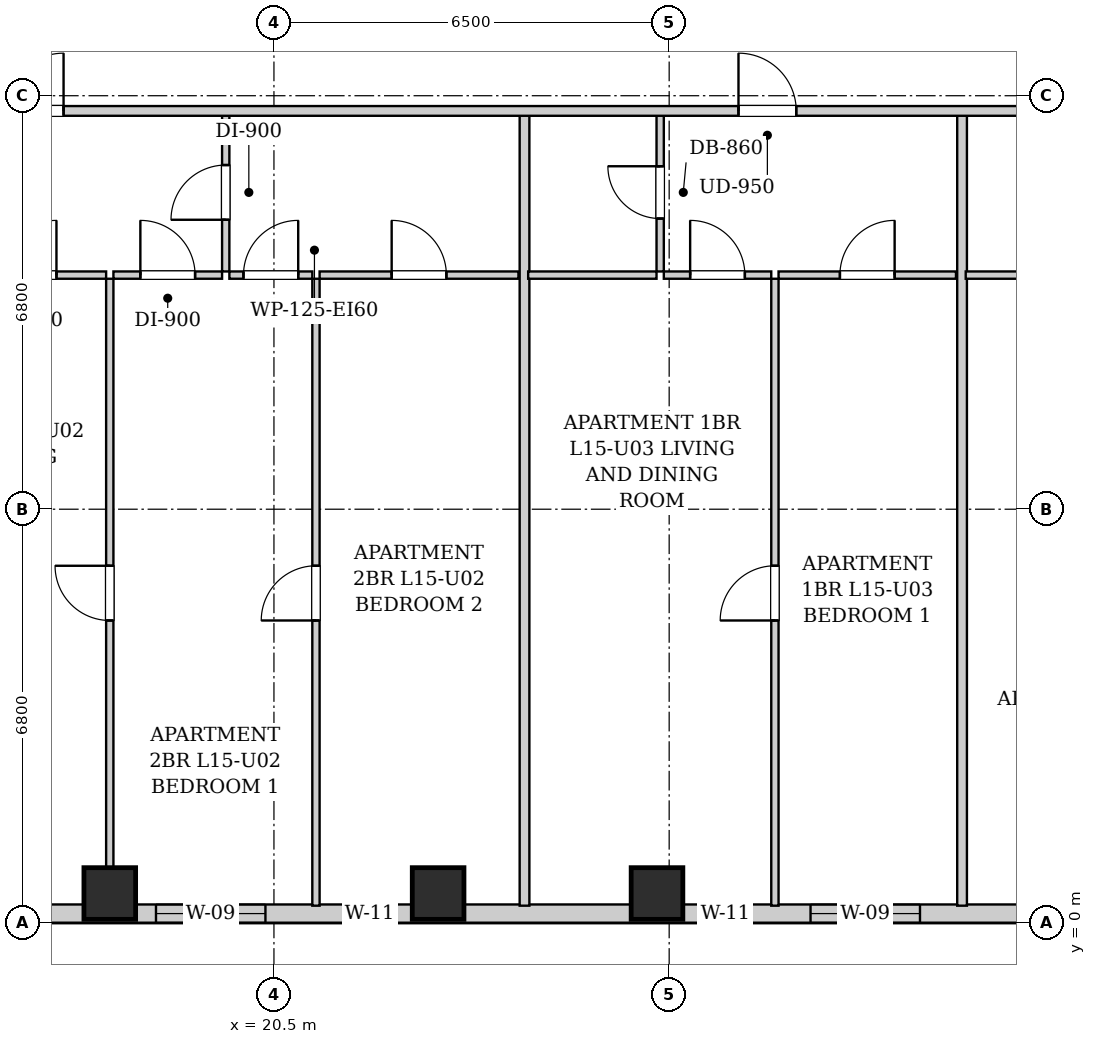
"""IFC4 building model, lengths in metres.
Left out: names, types, materials, properties, quantities, classifications, styles, units other than length and angle.
Written with IfcOpenShell. Run it as: python <this file> out.ifc"""

import sys

from ifc_helpers import new_model, si_unit, direction, frame, frame_2d, origin, origin_2d, place, context, subcontext, project, spatial, rectangle, extrude, element, fill, save


model = new_model("IFC4")
c1 = context("Model", 3, precision=1e-05, world=origin(), true_north=direction((0.0, 1.0)))
c2 = subcontext(c1, "Body", "Model", "MODEL_VIEW")
j1 = project(units=[si_unit("LENGTHUNIT", "METRE"), si_unit("PLANEANGLEUNIT", "RADIAN")], contexts=[c1])
p1 = place(None, origin())
s1 = spatial("IfcSite", under=j1, at=p1, CompositionType="ELEMENT")
p2 = place(p1, origin())
s2 = spatial("IfcBuilding", under=s1, at=p2, CompositionType="ELEMENT")
p3 = place(p2, frame((0.0, 0.0, 57.8)))
s3 = spatial("IfcBuildingStorey", under=s2, at=p3, CompositionType="ELEMENT", Elevation=57.8)
for number, where, z_axis, x_axis in (
    (1, (17.8, 0.48, 0.0), (0.0, 0.0, 1.0), (1.0, 0.0, 0.0)),
    (2, (23.2, 0.48, 0.0), (0.0, 0.0, 1.0), (1.0, 0.0, 0.0)),
    (3, (26.8, 0.48, 0.0), (0.0, 0.0, 1.0), (1.0, 0.0, 0.0)),
):
    element("IfcColumn", number, at=place(p3, frame(where, z_axis=z_axis, x_axis=x_axis)), inside=s3, PredefinedType="COLUMN", context=c2, shape_type="SweptSolid", body=[
        extrude(rectangle(XDim=0.85, YDim=0.85, at=origin_2d()), origin(), (0.0, 0.0, 1.0), 3.2),
    ])
p4 = place(p3, frame((44.0, 0.15, 0.0), z_axis=(0.0, 0.0, 1.0), x_axis=(-1.0, 0.0, 0.0)))
e4 = element("IfcWall", 4, at=p4, inside=s3, PredefinedType="SOLIDWALL", context=c2, shape_type="SweptSolid", body=[
    extrude(rectangle(XDim=27.55, YDim=0.3, at=frame_2d((13.775, 0.0))), origin(), (0.0, 0.0, 1.0), 1.975),
])
p5 = place(p4, frame((23.64, 0.0, 0.55)))
e5 = element("IfcOpeningElement", 5, at=p5, cuts=e4, PredefinedType="OPENING", context=c2, shape_type="SweptSolid", body=[
    extrude(rectangle(XDim=1.8, YDim=1.2, at=frame_2d((0.9, 0.6))), frame((0.0, 0.16, 0.0), z_axis=(0.0, -1.0, 0.0), x_axis=(1.0, 0.0, 0.0)), (0.0, 0.0, 1.0), 0.32),
])
p6 = place(p4, frame((21.5, 0.0, 0.55)))
e6 = element("IfcOpeningElement", 6, at=p6, cuts=e4, PredefinedType="OPENING", context=c2, shape_type="SweptSolid", body=[
    extrude(rectangle(XDim=0.85, YDim=1.2, at=frame_2d((0.425, 0.6))), frame((0.0, 0.16, 0.0), z_axis=(0.0, -1.0, 0.0), x_axis=(1.0, 0.0, 0.0)), (0.0, 0.0, 1.0), 0.32),
])
p7 = place(p4, frame((15.65, 0.0, 0.55)))
e7 = element("IfcOpeningElement", 7, at=p7, cuts=e4, PredefinedType="OPENING", context=c2, shape_type="SweptSolid", body=[
    extrude(rectangle(XDim=0.85, YDim=1.2, at=frame_2d((0.425, 0.6))), frame((0.0, 0.16, 0.0), z_axis=(0.0, -1.0, 0.0), x_axis=(1.0, 0.0, 0.0)), (0.0, 0.0, 1.0), 0.32),
])
p8 = place(p4, frame((12.875, 0.0, 0.55)))
e8 = element("IfcOpeningElement", 8, at=p8, cuts=e4, PredefinedType="OPENING", context=c2, shape_type="SweptSolid", body=[
    extrude(rectangle(XDim=1.8, YDim=1.2, at=frame_2d((0.9, 0.6))), frame((0.0, 0.16, 0.0), z_axis=(0.0, -1.0, 0.0), x_axis=(1.0, 0.0, 0.0)), (0.0, 0.0, 1.0), 0.32),
])
p9 = place(p4, frame((9.365, 0.0, 0.55)))
e9 = element("IfcOpeningElement", 9, at=p9, cuts=e4, PredefinedType="OPENING", context=c2, shape_type="SweptSolid", body=[
    extrude(rectangle(XDim=0.85, YDim=1.2, at=frame_2d((0.425, 0.6))), frame((0.0, 0.16, 0.0), z_axis=(0.0, -1.0, 0.0), x_axis=(1.0, 0.0, 0.0)), (0.0, 0.0, 1.0), 0.32),
])
p10 = place(p4, frame((6.477, 0.0, 0.55)))
e10 = element("IfcOpeningElement", 10, at=p10, cuts=e4, PredefinedType="OPENING", context=c2, shape_type="SweptSolid", body=[
    extrude(rectangle(XDim=1.8, YDim=1.2, at=frame_2d((0.9, 0.6))), frame((0.0, 0.16, 0.0), z_axis=(0.0, -1.0, 0.0), x_axis=(1.0, 0.0, 0.0)), (0.0, 0.0, 1.0), 0.32),
])
p11 = place(p4, frame((2.186, 0.0, 0.55)))
e11 = element("IfcOpeningElement", 11, at=p11, cuts=e4, PredefinedType="OPENING", context=c2, shape_type="SweptSolid", body=[
    extrude(rectangle(XDim=1.8, YDim=1.2, at=frame_2d((0.9, 0.6))), frame((0.0, 0.16, 0.0), z_axis=(0.0, -1.0, 0.0), x_axis=(1.0, 0.0, 0.0)), (0.0, 0.0, 1.0), 0.32),
])
p12 = place(p3, frame((19.707, 10.71, 0.0), z_axis=(0.0, 0.0, 1.0), x_axis=(0.0, 1.0, 0.0)))
e12 = element("IfcWall", 12, at=p12, inside=s3, PredefinedType="PARTITIONING", context=c2, shape_type="SweptSolid", body=[
    extrude(rectangle(XDim=2.6, YDim=0.12, at=frame_2d((1.3, 0.0))), origin(), (0.0, 0.0, 1.0), 2.94),
])
p13 = place(p12, frame((0.85, 0.0, 0.0)))
e13 = element("IfcOpeningElement", 13, at=p13, cuts=e12, PredefinedType="OPENING", context=c2, shape_type="SweptSolid", body=[
    extrude(rectangle(XDim=0.9, YDim=2.05, at=frame_2d((0.45, 1.025))), frame((0.0, 0.07, 0.0), z_axis=(0.0, -1.0, 0.0), x_axis=(1.0, 0.0, 0.0)), (0.0, 0.0, 1.0), 0.14),
])
p14 = place(p3, frame((15.207, 10.65, 0.0), z_axis=(0.0, 0.0, 1.0), x_axis=(1.0, 0.0, 0.0)))
e14 = element("IfcWall", 14, at=p14, inside=s3, PredefinedType="PARTITIONING", context=c2, shape_type="SweptSolid", body=[
    extrude(rectangle(XDim=2.533, YDim=0.12, at=frame_2d((1.267, 0.0))), origin(), (0.0, 0.0, 1.0), 2.94),
])
p15 = place(p14, frame((0.816, 0.0, 0.0)))
e15 = element("IfcOpeningElement", 15, at=p15, cuts=e14, PredefinedType="OPENING", context=c2, shape_type="SweptSolid", body=[
    extrude(rectangle(XDim=0.9, YDim=2.05, at=frame_2d((0.45, 1.025))), frame((0.0, 0.07, 0.0), z_axis=(0.0, -1.0, 0.0), x_axis=(1.0, 0.0, 0.0)), (0.0, 0.0, 1.0), 0.14),
])
p16 = place(p3, frame((17.86, 10.65, 0.0), z_axis=(0.0, 0.0, 1.0), x_axis=(1.0, 0.0, 0.0)))
e16 = element("IfcWall", 16, at=p16, inside=s3, PredefinedType="PARTITIONING", context=c2, shape_type="SweptSolid", body=[
    extrude(rectangle(XDim=1.787, YDim=0.12, at=frame_2d((0.894, 0.0))), origin(), (0.0, 0.0, 1.0), 2.94),
])
p17 = place(p16, frame((0.443, 0.0, 0.0)))
e17 = element("IfcOpeningElement", 17, at=p17, cuts=e16, PredefinedType="OPENING", context=c2, shape_type="SweptSolid", body=[
    extrude(rectangle(XDim=0.9, YDim=2.05, at=frame_2d((0.45, 1.025))), frame((0.0, 0.07, 0.0), z_axis=(0.0, -1.0, 0.0), x_axis=(1.0, 0.0, 0.0)), (0.0, 0.0, 1.0), 0.14),
])
p18 = place(p3, frame((19.767, 10.65, 0.0), z_axis=(0.0, 0.0, 1.0), x_axis=(1.0, 0.0, 0.0)))
e18 = element("IfcWall", 18, at=p18, inside=s3, PredefinedType="PARTITIONING", context=c2, shape_type="SweptSolid", body=[
    extrude(rectangle(XDim=1.364, YDim=0.12, at=frame_2d((0.682, 0.0))), origin(), (0.0, 0.0, 1.0), 2.94),
])
p19 = place(p18, frame((0.232, 0.0, 0.0)))
e19 = element("IfcOpeningElement", 19, at=p19, cuts=e18, PredefinedType="OPENING", context=c2, shape_type="SweptSolid", body=[
    extrude(rectangle(XDim=0.9, YDim=2.05, at=frame_2d((0.45, 1.025))), frame((0.0, 0.07, 0.0), z_axis=(0.0, -1.0, 0.0), x_axis=(1.0, 0.0, 0.0)), (0.0, 0.0, 1.0), 0.14),
])
p20 = place(p3, frame((21.251, 10.65, 0.0), z_axis=(0.0, 0.0, 1.0), x_axis=(1.0, 0.0, 0.0)))
e20 = element("IfcWall", 20, at=p20, inside=s3, PredefinedType="PARTITIONING", context=c2, shape_type="SweptSolid", body=[
    extrude(rectangle(XDim=3.27, YDim=0.12, at=frame_2d((1.635, 0.0))), origin(), (0.0, 0.0, 1.0), 2.94),
])
p21 = place(p20, frame((1.185, 0.0, 0.0)))
e21 = element("IfcOpeningElement", 21, at=p21, cuts=e20, PredefinedType="OPENING", context=c2, shape_type="SweptSolid", body=[
    extrude(rectangle(XDim=0.9, YDim=2.05, at=frame_2d((0.45, 1.025))), frame((0.0, 0.07, 0.0), z_axis=(0.0, -1.0, 0.0), x_axis=(1.0, 0.0, 0.0)), (0.0, 0.0, 1.0), 0.14),
])
p22 = place(p3, frame((17.8, 0.28, 0.0), z_axis=(0.0, 0.0, 1.0), x_axis=(0.0, 1.0, 0.0)))
e22 = element("IfcWall", 22, at=p22, inside=s3, PredefinedType="PARTITIONING", context=c2, shape_type="SweptSolid", body=[
    extrude(rectangle(XDim=10.31, YDim=0.12, at=frame_2d((5.155, 0.0))), origin(), (0.0, 0.0, 1.0), 2.232),
])
p23 = place(p22, frame((4.69, 0.0, 0.0)))
e23 = element("IfcOpeningElement", 23, at=p23, cuts=e22, PredefinedType="OPENING", context=c2, shape_type="SweptSolid", body=[
    extrude(rectangle(XDim=0.9, YDim=2.05, at=frame_2d((0.45, 1.025))), frame((0.0, 0.07, 0.0), z_axis=(0.0, -1.0, 0.0), x_axis=(1.0, 0.0, 0.0)), (0.0, 0.0, 1.0), 0.14),
])
p24 = place(p3, frame((21.191, 0.28, 0.0), z_axis=(0.0, 0.0, 1.0), x_axis=(0.0, 1.0, 0.0)))
e24 = element("IfcWall", 24, at=p24, inside=s3, PredefinedType="PARTITIONING", context=c2, shape_type="SweptSolid", body=[
    extrude(rectangle(XDim=10.31, YDim=0.12, at=frame_2d((5.155, 0.0))), origin(), (0.0, 0.0, 1.0), 2.94),
])
p25 = place(p24, frame((4.69, 0.0, 0.0)))
e25 = element("IfcOpeningElement", 25, at=p25, cuts=e24, PredefinedType="OPENING", context=c2, shape_type="SweptSolid", body=[
    extrude(rectangle(XDim=0.9, YDim=2.05, at=frame_2d((0.45, 1.025))), frame((0.0, 0.07, 0.0), z_axis=(0.0, -1.0, 0.0), x_axis=(1.0, 0.0, 0.0)), (0.0, 0.0, 1.0), 0.14),
])
p26 = place(p3, frame((24.621, 0.28, 0.0), z_axis=(0.0, 0.0, 1.0), x_axis=(0.0, 1.0, 0.0)))
e26 = element("IfcWall", 26, at=p26, inside=s3, PredefinedType="PARTITIONING", context=c2, shape_type="SweptSolid", body=[
    extrude(rectangle(XDim=13.03, YDim=0.16, at=frame_2d((6.515, 0.0))), origin(), (0.0, 0.0, 1.0), 2.94),
])
p27 = place(p3, frame((26.852, 10.71, 0.0), z_axis=(0.0, 0.0, 1.0), x_axis=(0.0, 1.0, 0.0)))
e27 = element("IfcWall", 27, at=p27, inside=s3, PredefinedType="PARTITIONING", context=c2, shape_type="SweptSolid", body=[
    extrude(rectangle(XDim=2.6, YDim=0.12, at=frame_2d((1.3, 0.0))), origin(), (0.0, 0.0, 1.0), 2.94),
])
p28 = place(p27, frame((0.87, 0.0, 0.0)))
e28 = element("IfcOpeningElement", 28, at=p28, cuts=e27, PredefinedType="OPENING", context=c2, shape_type="SweptSolid", body=[
    extrude(rectangle(XDim=0.86, YDim=2.05, at=frame_2d((0.43, 1.025))), frame((0.0, 0.07, 0.0), z_axis=(0.0, -1.0, 0.0), x_axis=(1.0, 0.0, 0.0)), (0.0, 0.0, 1.0), 0.14),
])
p29 = place(p3, frame((24.681, 10.65, 0.0), z_axis=(0.0, 0.0, 1.0), x_axis=(1.0, 0.0, 0.0)))
e29 = element("IfcWall", 29, at=p29, inside=s3, PredefinedType="PARTITIONING", context=c2, shape_type="SweptSolid", body=[
    extrude(rectangle(XDim=2.111, YDim=0.12, at=frame_2d((1.056, 0.0))), origin(), (0.0, 0.0, 1.0), 2.94),
])
p30 = place(p3, frame((26.912, 10.65, 0.0), z_axis=(0.0, 0.0, 1.0), x_axis=(1.0, 0.0, 0.0)))
e30 = element("IfcWall", 30, at=p30, inside=s3, PredefinedType="PARTITIONING", context=c2, shape_type="SweptSolid", body=[
    extrude(rectangle(XDim=1.767, YDim=0.12, at=frame_2d((0.883, 0.0))), origin(), (0.0, 0.0, 1.0), 2.94),
])
p31 = place(p30, frame((0.433, 0.0, 0.0)))
e31 = element("IfcOpeningElement", 31, at=p31, cuts=e30, PredefinedType="OPENING", context=c2, shape_type="SweptSolid", body=[
    extrude(rectangle(XDim=0.9, YDim=2.05, at=frame_2d((0.45, 1.025))), frame((0.0, 0.07, 0.0), z_axis=(0.0, -1.0, 0.0), x_axis=(1.0, 0.0, 0.0)), (0.0, 0.0, 1.0), 0.14),
])
p32 = place(p3, frame((28.799, 10.65, 0.0), z_axis=(0.0, 0.0, 1.0), x_axis=(1.0, 0.0, 0.0)))
e32 = element("IfcWall", 32, at=p32, inside=s3, PredefinedType="PARTITIONING", context=c2, shape_type="SweptSolid", body=[
    extrude(rectangle(XDim=2.918, YDim=0.12, at=frame_2d((1.459, 0.0))), origin(), (0.0, 0.0, 1.0), 2.94),
])
p33 = place(p32, frame((1.009, 0.0, 0.0)))
e33 = element("IfcOpeningElement", 33, at=p33, cuts=e32, PredefinedType="OPENING", context=c2, shape_type="SweptSolid", body=[
    extrude(rectangle(XDim=0.9, YDim=2.05, at=frame_2d((0.45, 1.025))), frame((0.0, 0.07, 0.0), z_axis=(0.0, -1.0, 0.0), x_axis=(1.0, 0.0, 0.0)), (0.0, 0.0, 1.0), 0.14),
])
p34 = place(p3, frame((28.739, 0.28, 0.0), z_axis=(0.0, 0.0, 1.0), x_axis=(0.0, 1.0, 0.0)))
e34 = element("IfcWall", 34, at=p34, inside=s3, PredefinedType="PARTITIONING", context=c2, shape_type="SweptSolid", body=[
    extrude(rectangle(XDim=10.31, YDim=0.12, at=frame_2d((5.155, 0.0))), origin(), (0.0, 0.0, 1.0), 2.94),
])
p35 = place(p34, frame((4.69, 0.0, 0.0)))
e35 = element("IfcOpeningElement", 35, at=p35, cuts=e34, PredefinedType="OPENING", context=c2, shape_type="SweptSolid", body=[
    extrude(rectangle(XDim=0.9, YDim=2.05, at=frame_2d((0.45, 1.025))), frame((0.0, 0.07, 0.0), z_axis=(0.0, -1.0, 0.0), x_axis=(1.0, 0.0, 0.0)), (0.0, 0.0, 1.0), 0.14),
])
p36 = place(p3, frame((31.817, 0.28, 0.0), z_axis=(0.0, 0.0, 1.0), x_axis=(0.0, 1.0, 0.0)))
e36 = element("IfcWall", 36, at=p36, inside=s3, PredefinedType="PARTITIONING", context=c2, shape_type="SweptSolid", body=[
    extrude(rectangle(XDim=13.03, YDim=0.16, at=frame_2d((6.515, 0.0))), origin(), (0.0, 0.0, 1.0), 2.94),
])
p37 = place(p3, frame((31.877, 10.65, 0.0), z_axis=(0.0, 0.0, 1.0), x_axis=(1.0, 0.0, 0.0)))
e37 = element("IfcWall", 37, at=p37, inside=s3, PredefinedType="PARTITIONING", context=c2, shape_type="SweptSolid", body=[
    extrude(rectangle(XDim=2.4, YDim=0.12, at=frame_2d((1.2, 0.0))), origin(), (0.0, 0.0, 1.0), 2.94),
])
p38 = place(p3, frame((10.05, 13.35, 0.0), z_axis=(0.0, 0.0, 1.0), x_axis=(1.0, 0.0, 0.0)))
e38 = element("IfcWall", 38, at=p38, inside=s3, PredefinedType="PARTITIONING", context=c2, shape_type="SweptSolid", body=[
    extrude(rectangle(XDim=33.9, YDim=0.16, at=frame_2d((16.95, 0.0))), origin(), (0.0, 0.0, 1.0), 2.94),
])
p39 = place(p38, frame((0.813, 0.0, 0.0)))
e39 = element("IfcOpeningElement", 39, at=p39, cuts=e38, PredefinedType="OPENING", context=c2, shape_type="SweptSolid", body=[
    extrude(rectangle(XDim=0.95, YDim=2.1, at=frame_2d((0.475, 1.05))), frame((0.0, 0.09, 0.0), z_axis=(0.0, -1.0, 0.0), x_axis=(1.0, 0.0, 0.0)), (0.0, 0.0, 1.0), 0.18),
])
p40 = place(p38, frame((6.04, 0.0, 0.0)))
e40 = element("IfcOpeningElement", 40, at=p40, cuts=e38, PredefinedType="OPENING", context=c2, shape_type="SweptSolid", body=[
    extrude(rectangle(XDim=0.95, YDim=2.1, at=frame_2d((0.475, 1.05))), frame((0.0, 0.09, 0.0), z_axis=(0.0, -1.0, 0.0), x_axis=(1.0, 0.0, 0.0)), (0.0, 0.0, 1.0), 0.18),
])
p41 = place(p38, frame((18.09, 0.0, 0.0)))
e41 = element("IfcOpeningElement", 41, at=p41, cuts=e38, PredefinedType="OPENING", context=c2, shape_type="SweptSolid", body=[
    extrude(rectangle(XDim=0.95, YDim=2.1, at=frame_2d((0.475, 1.05))), frame((0.0, 0.09, 0.0), z_axis=(0.0, -1.0, 0.0), x_axis=(1.0, 0.0, 0.0)), (0.0, 0.0, 1.0), 0.18),
])
p42 = place(p38, frame((25.962, 0.0, 0.0)))
e42 = element("IfcOpeningElement", 42, at=p42, cuts=e38, PredefinedType="OPENING", context=c2, shape_type="SweptSolid", body=[
    extrude(rectangle(XDim=0.95, YDim=2.1, at=frame_2d((0.475, 1.05))), frame((0.0, 0.09, 0.0), z_axis=(0.0, -1.0, 0.0), x_axis=(1.0, 0.0, 0.0)), (0.0, 0.0, 1.0), 0.18),
])
p43 = place(p13, origin())
e43 = element("IfcDoor", 43, at=p43, inside=s3, OperationType="SINGLE_SWING_LEFT", PredefinedType="DOOR", context=c2, shape_type="SweptSolid", body=[
    extrude(rectangle(XDim=0.9, YDim=2.05, at=frame_2d((0.45, 1.025))), frame((0.0, 0.025, 0.0), z_axis=(0.0, -1.0, 0.0), x_axis=(1.0, 0.0, 0.0)), (0.0, 0.0, 1.0), 0.05),
])
fill(e13, e43)
p44 = place(p15, origin())
e44 = element("IfcDoor", 44, at=p44, inside=s3, OperationType="SINGLE_SWING_RIGHT", PredefinedType="DOOR", context=c2, shape_type="SweptSolid", body=[
    extrude(rectangle(XDim=0.9, YDim=2.05, at=frame_2d((0.45, 1.025))), frame((0.0, 0.025, 0.0), z_axis=(0.0, -1.0, 0.0), x_axis=(1.0, 0.0, 0.0)), (0.0, 0.0, 1.0), 0.05),
])
fill(e15, e44)
p45 = place(p17, origin())
e45 = element("IfcDoor", 45, at=p45, inside=s3, OperationType="SINGLE_SWING_LEFT", PredefinedType="DOOR", context=c2, shape_type="SweptSolid", body=[
    extrude(rectangle(XDim=0.9, YDim=2.05, at=frame_2d((0.45, 1.025))), frame((0.0, 0.025, 0.0), z_axis=(0.0, -1.0, 0.0), x_axis=(1.0, 0.0, 0.0)), (0.0, 0.0, 1.0), 0.05),
])
fill(e17, e45)
p46 = place(p19, origin())
e46 = element("IfcDoor", 46, at=p46, inside=s3, OperationType="SINGLE_SWING_RIGHT", PredefinedType="DOOR", context=c2, shape_type="SweptSolid", body=[
    extrude(rectangle(XDim=0.9, YDim=2.05, at=frame_2d((0.45, 1.025))), frame((0.0, 0.025, 0.0), z_axis=(0.0, -1.0, 0.0), x_axis=(1.0, 0.0, 0.0)), (0.0, 0.0, 1.0), 0.05),
])
fill(e19, e46)
p47 = place(p21, origin())
e47 = element("IfcDoor", 47, at=p47, inside=s3, OperationType="SINGLE_SWING_LEFT", PredefinedType="DOOR", context=c2, shape_type="SweptSolid", body=[
    extrude(rectangle(XDim=0.9, YDim=2.05, at=frame_2d((0.45, 1.025))), frame((0.0, 0.025, 0.0), z_axis=(0.0, -1.0, 0.0), x_axis=(1.0, 0.0, 0.0)), (0.0, 0.0, 1.0), 0.05),
])
fill(e21, e47)
p48 = place(p23, origin())
e48 = element("IfcDoor", 48, at=p48, inside=s3, OperationType="SINGLE_SWING_RIGHT", PredefinedType="DOOR", context=c2, shape_type="SweptSolid", body=[
    extrude(rectangle(XDim=0.9, YDim=2.05, at=frame_2d((0.45, 1.025))), frame((0.0, 0.025, 0.0), z_axis=(0.0, -1.0, 0.0), x_axis=(1.0, 0.0, 0.0)), (0.0, 0.0, 1.0), 0.05),
])
fill(e23, e48)
p49 = place(p25, origin())
e49 = element("IfcDoor", 49, at=p49, inside=s3, OperationType="SINGLE_SWING_LEFT", PredefinedType="DOOR", context=c2, shape_type="SweptSolid", body=[
    extrude(rectangle(XDim=0.9, YDim=2.05, at=frame_2d((0.45, 1.025))), frame((0.0, 0.025, 0.0), z_axis=(0.0, -1.0, 0.0), x_axis=(1.0, 0.0, 0.0)), (0.0, 0.0, 1.0), 0.05),
])
fill(e25, e49)
p50 = place(p28, origin())
e50 = element("IfcDoor", 50, at=p50, inside=s3, OperationType="SINGLE_SWING_RIGHT", PredefinedType="DOOR", context=c2, shape_type="SweptSolid", body=[
    extrude(rectangle(XDim=0.86, YDim=2.05, at=frame_2d((0.43, 1.025))), frame((0.0, 0.025, 0.0), z_axis=(0.0, -1.0, 0.0), x_axis=(1.0, 0.0, 0.0)), (0.0, 0.0, 1.0), 0.05),
])
fill(e28, e50)
p51 = place(p31, origin())
e51 = element("IfcDoor", 51, at=p51, inside=s3, OperationType="SINGLE_SWING_LEFT", PredefinedType="DOOR", context=c2, shape_type="SweptSolid", body=[
    extrude(rectangle(XDim=0.9, YDim=2.05, at=frame_2d((0.45, 1.025))), frame((0.0, 0.025, 0.0), z_axis=(0.0, -1.0, 0.0), x_axis=(1.0, 0.0, 0.0)), (0.0, 0.0, 1.0), 0.05),
])
fill(e31, e51)
p52 = place(p33, origin())
e52 = element("IfcDoor", 52, at=p52, inside=s3, OperationType="SINGLE_SWING_RIGHT", PredefinedType="DOOR", context=c2, shape_type="SweptSolid", body=[
    extrude(rectangle(XDim=0.9, YDim=2.05, at=frame_2d((0.45, 1.025))), frame((0.0, 0.025, 0.0), z_axis=(0.0, -1.0, 0.0), x_axis=(1.0, 0.0, 0.0)), (0.0, 0.0, 1.0), 0.05),
])
fill(e33, e52)
p53 = place(p35, origin())
e53 = element("IfcDoor", 53, at=p53, inside=s3, OperationType="SINGLE_SWING_LEFT", PredefinedType="DOOR", context=c2, shape_type="SweptSolid", body=[
    extrude(rectangle(XDim=0.9, YDim=2.05, at=frame_2d((0.45, 1.025))), frame((0.0, 0.025, 0.0), z_axis=(0.0, -1.0, 0.0), x_axis=(1.0, 0.0, 0.0)), (0.0, 0.0, 1.0), 0.05),
])
fill(e35, e53)
p54 = place(p40, origin())
e54 = element("IfcDoor", 54, at=p54, inside=s3, OperationType="SINGLE_SWING_RIGHT", PredefinedType="DOOR", context=c2, shape_type="SweptSolid", body=[
    extrude(rectangle(XDim=0.95, YDim=2.1, at=frame_2d((0.475, 1.05))), frame((0.0, 0.025, 0.0), z_axis=(0.0, -1.0, 0.0), x_axis=(1.0, 0.0, 0.0)), (0.0, 0.0, 1.0), 0.05),
])
fill(e40, e54)
p55 = place(p41, origin())
e55 = element("IfcDoor", 55, at=p55, inside=s3, OperationType="SINGLE_SWING_LEFT", PredefinedType="DOOR", context=c2, shape_type="SweptSolid", body=[
    extrude(rectangle(XDim=0.95, YDim=2.1, at=frame_2d((0.475, 1.05))), frame((0.0, 0.025, 0.0), z_axis=(0.0, -1.0, 0.0), x_axis=(1.0, 0.0, 0.0)), (0.0, 0.0, 1.0), 0.05),
])
fill(e41, e55)
p56 = place(p5, origin())
e56 = element("IfcWindow", 56, at=p56, inside=s3, PartitioningType="DOUBLE_PANEL_VERTICAL", PredefinedType="WINDOW", context=c2, shape_type="SweptSolid", body=[
    extrude(rectangle(XDim=1.8, YDim=1.2, at=frame_2d((0.9, 0.6))), frame((0.0, 0.03, 0.0), z_axis=(0.0, -1.0, 0.0), x_axis=(1.0, 0.0, 0.0)), (0.0, 0.0, 1.0), 0.06),
])
fill(e5, e56)
p57 = place(p6, origin())
e57 = element("IfcWindow", 57, at=p57, inside=s3, PartitioningType="SINGLE_PANEL", PredefinedType="WINDOW", context=c2, shape_type="SweptSolid", body=[
    extrude(rectangle(XDim=0.85, YDim=1.2, at=frame_2d((0.425, 0.6))), frame((0.0, 0.03, 0.0), z_axis=(0.0, -1.0, 0.0), x_axis=(1.0, 0.0, 0.0)), (0.0, 0.0, 1.0), 0.06),
])
fill(e6, e57)
p58 = place(p7, origin())
e58 = element("IfcWindow", 58, at=p58, inside=s3, PartitioningType="SINGLE_PANEL", PredefinedType="WINDOW", context=c2, shape_type="SweptSolid", body=[
    extrude(rectangle(XDim=0.85, YDim=1.2, at=frame_2d((0.425, 0.6))), frame((0.0, 0.03, 0.0), z_axis=(0.0, -1.0, 0.0), x_axis=(1.0, 0.0, 0.0)), (0.0, 0.0, 1.0), 0.06),
])
fill(e7, e58)
p59 = place(p8, origin())
e59 = element("IfcWindow", 59, at=p59, inside=s3, PartitioningType="DOUBLE_PANEL_VERTICAL", PredefinedType="WINDOW", context=c2, shape_type="SweptSolid", body=[
    extrude(rectangle(XDim=1.8, YDim=1.2, at=frame_2d((0.9, 0.6))), frame((0.0, 0.03, 0.0), z_axis=(0.0, -1.0, 0.0), x_axis=(1.0, 0.0, 0.0)), (0.0, 0.0, 1.0), 0.06),
])
fill(e8, e59)
save(model, sys.argv[1])
